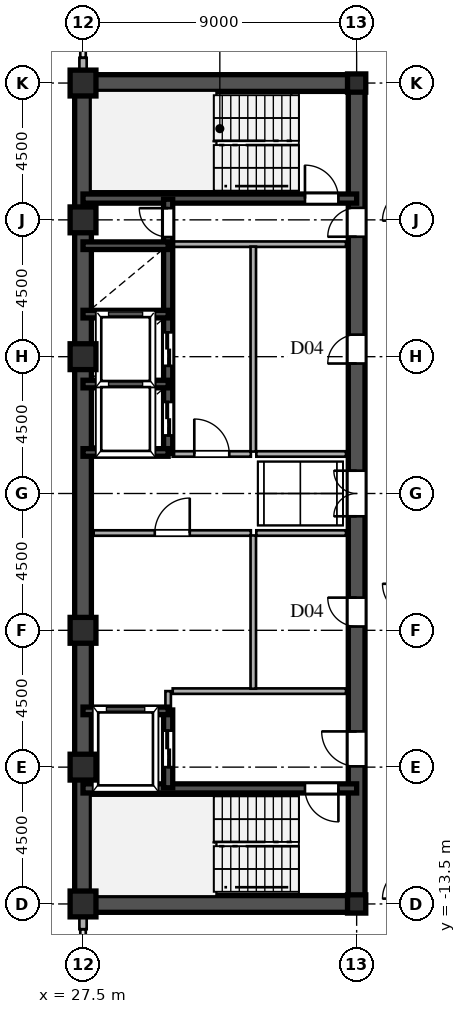
"""IFC4 building model, lengths in metres.
Left out: names, types, materials, properties, quantities, classifications, styles, units other than length and angle.
Written with IfcOpenShell. Run it as: python <this file> out.ifc"""

import sys

from ifc_helpers import new_model, si_unit, direction, frame, frame_2d, origin, origin_2d, place, context, subcontext, project, spatial, rectangle, hollow_rectangle, i_section, extrude, source, transform, mapped, element, fill, save


model = new_model("IFC4")
c1 = context("Model", 3, precision=1e-05, world=origin(), true_north=direction((0.0, 1.0)))
c2 = subcontext(c1, "Body", "Model", "MODEL_VIEW")
j1 = project(units=[si_unit("LENGTHUNIT", "METRE"), si_unit("PLANEANGLEUNIT", "RADIAN")], contexts=[c1])
p1 = place(None, origin())
s1 = spatial("IfcSite", under=j1, at=p1, CompositionType="ELEMENT")
p2 = place(p1, origin())
s2 = spatial("IfcBuilding", under=s1, at=p2, CompositionType="ELEMENT")
p3 = place(p2, frame((0.0, 0.0, 188.7)))
s3 = spatial("IfcBuildingStorey", under=s2, at=p3, CompositionType="ELEMENT", Elevation=188.7)
m1 = source(origin(), c2, "Body", "SweptSolid", [
    extrude(hollow_rectangle(XDim=0.85, YDim=0.85, WallThickness=0.036, at=origin_2d()), origin(), (0.0, 0.0, 1.0), 3.6),
])
for number, where, z_axis, x_axis in (
    (1, (27.5, -13.5, 0.0), (0.0, 0.0, 1.0), (1.0, 0.0, 0.0)),
    (2, (27.5, -9.0, 0.0), (0.0, 0.0, 1.0), (1.0, 0.0, 0.0)),
    (3, (27.5, -4.5, 0.0), (0.0, 0.0, 1.0), (1.0, 0.0, 0.0)),
    (4, (27.5, 4.5, 0.0), (0.0, 0.0, 1.0), (1.0, 0.0, 0.0)),
    (5, (27.5, 9.0, 0.0), (0.0, 0.0, 1.0), (1.0, 0.0, 0.0)),
    (6, (27.5, 13.5, 0.0), (0.0, 0.0, 1.0), (1.0, 0.0, 0.0)),
):
    element("IfcColumn", number, at=place(p3, frame(where, z_axis=z_axis, x_axis=x_axis)), inside=s3, PredefinedType="COLUMN", context=c2, shape_type="MappedRepresentation", body=[
        mapped(m1, transform((0.0, 0.0, 0.0), scale=1.0)),
    ])
m2 = source(origin(), c2, "Body", "SweptSolid", [
    extrude(i_section(OverallWidth=0.6, OverallDepth=0.6, WebThickness=0.025, FlangeThickness=0.04, at=origin_2d()), origin(), (0.0, 0.0, 1.0), 3.6),
])
for number, where, z_axis, x_axis in (
    (7, (36.5, -13.5, 0.0), (0.0, 0.0, 1.0), (1.0, 0.0, 0.0)),
    (8, (36.5, 13.5, 0.0), (0.0, 0.0, 1.0), (1.0, 0.0, 0.0)),
):
    element("IfcColumn", number, at=place(p3, frame(where, z_axis=z_axis, x_axis=x_axis)), inside=s3, PredefinedType="COLUMN", context=c2, shape_type="MappedRepresentation", body=[
        mapped(m2, transform((0.0, 0.0, 0.0), scale=1.0)),
    ])
for number, where, z_axis, x_axis in (
    (9, (27.5, -14.33, 0.0), (0.0, 0.0, 1.0), (0.0, 1.0, 0.0)),
    (10, (27.5, 13.78, 0.0), (0.0, 0.0, 1.0), (0.0, 1.0, 0.0)),
):
    element("IfcWall", number, at=place(p3, frame(where, z_axis=z_axis, x_axis=x_axis)), inside=s3, PredefinedType="SOLIDWALL", context=c2, shape_type="SweptSolid", body=[
        extrude(rectangle(XDim=0.55, YDim=0.24, at=frame_2d((0.275, 0.0))), origin(), (0.0, 0.0, 1.0), 2.88),
    ])
for number, where, z_axis, x_axis in (
    (11, (27.5, -13.5, 0.0), (0.0, 0.0, 1.0), (0.0, 1.0, 0.0)),
    (12, (27.5, 1.3, 0.0), (0.0, 0.0, 1.0), (0.0, 1.0, 0.0)),
):
    element("IfcWall", number, at=place(p3, frame(where, z_axis=z_axis, x_axis=x_axis)), inside=s3, PredefinedType="SHEAR", context=c2, shape_type="SweptSolid", body=[
        extrude(rectangle(XDim=12.2, YDim=0.55, at=frame_2d((6.1, 0.0))), origin(), (0.0, 0.0, 1.0), 3.38),
    ])
p4 = place(p3, frame((27.5, -1.3, 0.0), z_axis=(0.0, 0.0, 1.0), x_axis=(0.0, 1.0, 0.0)))
e13 = element("IfcWall", 13, at=p4, inside=s3, PredefinedType="SHEAR", context=c2, shape_type="SweptSolid", body=[
    extrude(rectangle(XDim=2.6, YDim=0.55, at=frame_2d((1.3, 0.0))), origin(), (0.0, 0.0, 1.0), 3.38),
])
for number, where, z_axis, x_axis in (
    (14, (27.5, -13.5, 0.0), (0.0, 0.0, 1.0), (1.0, 0.0, 0.0)),
    (15, (27.5, 13.5, 0.0), (0.0, 0.0, 1.0), (1.0, 0.0, 0.0)),
):
    element("IfcWall", number, at=place(p3, frame(where, z_axis=z_axis, x_axis=x_axis)), inside=s3, PredefinedType="SHEAR", context=c2, shape_type="SweptSolid", body=[
        extrude(rectangle(XDim=9.0, YDim=0.55, at=frame_2d((4.5, 0.0))), origin(), (0.0, 0.0, 1.0), 3.38),
    ])
p5 = place(p3, frame((36.5, -13.65, 0.0), z_axis=(0.0, 0.0, 1.0), x_axis=(0.0, 1.0, 0.0)))
e16 = element("IfcWall", 16, at=p5, inside=s3, PredefinedType="SHEAR", context=c2, shape_type="SweptSolid", body=[
    extrude(rectangle(XDim=7.15, YDim=0.55, at=frame_2d((3.575, 0.0))), origin(), (0.0, 0.0, 1.0), 3.38),
])
p6 = place(p5, frame((4.675, 0.0, 0.0)))
e17 = element("IfcOpeningElement", 17, at=p6, cuts=e16, PredefinedType="OPENING", context=c2, shape_type="SweptSolid", body=[
    extrude(rectangle(XDim=1.15, YDim=2.2, at=frame_2d((0.575, 1.1))), frame((0.0, 0.285, 0.0), z_axis=(0.0, -1.0, 0.0), x_axis=(1.0, 0.0, 0.0)), (0.0, 0.0, 1.0), 0.57),
])
p7 = place(p3, frame((36.5, -1.3, 0.0), z_axis=(0.0, 0.0, 1.0), x_axis=(0.0, 1.0, 0.0)))
e18 = element("IfcWall", 18, at=p7, inside=s3, PredefinedType="SHEAR", context=c2, shape_type="SweptSolid", body=[
    extrude(rectangle(XDim=2.6, YDim=0.55, at=frame_2d((1.3, 0.0))), origin(), (0.0, 0.0, 1.0), 3.38),
])
p8 = place(p7, frame((0.55, 0.0, 0.0)))
e19 = element("IfcOpeningElement", 19, at=p8, cuts=e18, PredefinedType="OPENING", context=c2, shape_type="SweptSolid", body=[
    extrude(rectangle(XDim=1.5, YDim=2.3, at=frame_2d((0.75, 1.15))), frame((0.0, 0.285, 0.0), z_axis=(0.0, -1.0, 0.0), x_axis=(1.0, 0.0, 0.0)), (0.0, 0.0, 1.0), 0.57),
])
p9 = place(p3, frame((36.5, 8.2, 0.0), z_axis=(0.0, 0.0, 1.0), x_axis=(0.0, 1.0, 0.0)))
e20 = element("IfcWall", 20, at=p9, inside=s3, PredefinedType="SHEAR", context=c2, shape_type="SweptSolid", body=[
    extrude(rectangle(XDim=5.45, YDim=0.55, at=frame_2d((2.725, 0.0))), origin(), (0.0, 0.0, 1.0), 3.38),
])
p10 = place(p9, frame((0.245, 0.0, 0.0)))
e21 = element("IfcOpeningElement", 21, at=p10, cuts=e20, PredefinedType="OPENING", context=c2, shape_type="SweptSolid", body=[
    extrude(rectangle(XDim=0.95, YDim=2.15, at=frame_2d((0.475, 1.075))), frame((0.0, 0.285, 0.0), z_axis=(0.0, -1.0, 0.0), x_axis=(1.0, 0.0, 0.0)), (0.0, 0.0, 1.0), 0.57),
])
p11 = place(p3, frame((36.5, -6.5, 0.0), z_axis=(0.0, 0.0, 1.0), x_axis=(0.0, 1.0, 0.0)))
e22 = element("IfcWall", 22, at=p11, inside=s3, PredefinedType="SHEAR", context=c2, shape_type="SweptSolid", body=[
    extrude(rectangle(XDim=5.2, YDim=0.55, at=frame_2d((2.6, 0.0))), origin(), (0.0, 0.0, 1.0), 3.38),
])
p12 = place(p11, frame((2.125, 0.0, 0.0)))
e23 = element("IfcOpeningElement", 23, at=p12, cuts=e22, PredefinedType="OPENING", context=c2, shape_type="SweptSolid", body=[
    extrude(rectangle(XDim=0.95, YDim=2.15, at=frame_2d((0.475, 1.075))), frame((0.0, 0.285, 0.0), z_axis=(0.0, -1.0, 0.0), x_axis=(1.0, 0.0, 0.0)), (0.0, 0.0, 1.0), 0.57),
])
p13 = place(p3, frame((36.5, 1.3, 0.0), z_axis=(0.0, 0.0, 1.0), x_axis=(0.0, 1.0, 0.0)))
e24 = element("IfcWall", 24, at=p13, inside=s3, PredefinedType="SHEAR", context=c2, shape_type="SweptSolid", body=[
    extrude(rectangle(XDim=6.9, YDim=0.55, at=frame_2d((3.45, 0.0))), origin(), (0.0, 0.0, 1.0), 3.38),
])
p14 = place(p13, frame((2.975, 0.0, 0.0)))
e25 = element("IfcOpeningElement", 25, at=p14, cuts=e24, PredefinedType="OPENING", context=c2, shape_type="SweptSolid", body=[
    extrude(rectangle(XDim=0.95, YDim=2.15, at=frame_2d((0.475, 1.075))), frame((0.0, 0.285, 0.0), z_axis=(0.0, -1.0, 0.0), x_axis=(1.0, 0.0, 0.0)), (0.0, 0.0, 1.0), 0.57),
])
p15 = place(p3, frame((27.5, -9.7, 0.0), z_axis=(0.0, 0.0, 1.0), x_axis=(1.0, 0.0, 0.0)))
e26 = element("IfcWall", 26, at=p15, inside=s3, PredefinedType="SHEAR", context=c2, shape_type="SweptSolid", body=[
    extrude(rectangle(XDim=9.0, YDim=0.3, at=frame_2d((4.5, 0.0))), origin(), (0.0, 0.0, 1.0), 3.38),
])
p16 = place(p15, frame((7.3, 0.0, 0.0)))
e27 = element("IfcOpeningElement", 27, at=p16, cuts=e26, PredefinedType="OPENING", context=c2, shape_type="SweptSolid", body=[
    extrude(rectangle(XDim=1.1, YDim=2.2, at=frame_2d((0.55, 1.1))), frame((0.0, 0.16, 0.0), z_axis=(0.0, -1.0, 0.0), x_axis=(1.0, 0.0, 0.0)), (0.0, 0.0, 1.0), 0.32),
])
p17 = place(p3, frame((27.5, 9.7, 0.0), z_axis=(0.0, 0.0, 1.0), x_axis=(1.0, 0.0, 0.0)))
e28 = element("IfcWall", 28, at=p17, inside=s3, PredefinedType="SHEAR", context=c2, shape_type="SweptSolid", body=[
    extrude(rectangle(XDim=9.0, YDim=0.3, at=frame_2d((4.5, 0.0))), origin(), (0.0, 0.0, 1.0), 3.38),
])
p18 = place(p17, frame((7.3, 0.0, 0.0)))
e29 = element("IfcOpeningElement", 29, at=p18, cuts=e28, PredefinedType="OPENING", context=c2, shape_type="SweptSolid", body=[
    extrude(rectangle(XDim=1.1, YDim=2.2, at=frame_2d((0.55, 1.1))), frame((0.0, 0.16, 0.0), z_axis=(0.0, -1.0, 0.0), x_axis=(1.0, 0.0, 0.0)), (0.0, 0.0, 1.0), 0.32),
])
for number, where, z_axis, x_axis in (
    (30, (27.5, -7.15, 0.0), (0.0, 0.0, 1.0), (1.0, 0.0, 0.0)),
    (31, (27.5, 1.35, 0.0), (0.0, 0.0, 1.0), (1.0, 0.0, 0.0)),
    (32, (27.5, 3.6, 0.0), (0.0, 0.0, 1.0), (1.0, 0.0, 0.0)),
    (33, (27.5, 5.9, 0.0), (0.0, 0.0, 1.0), (1.0, 0.0, 0.0)),
    (34, (27.5, 8.15, 0.0), (0.0, 0.0, 1.0), (1.0, 0.0, 0.0)),
):
    element("IfcWall", number, at=place(p3, frame(where, z_axis=z_axis, x_axis=x_axis)), inside=s3, PredefinedType="SHEAR", context=c2, shape_type="SweptSolid", body=[
        extrude(rectangle(XDim=2.8, YDim=0.25, at=frame_2d((1.4, 0.0))), origin(), (0.0, 0.0, 1.0), 3.38),
    ])
p19 = place(p3, frame((30.3, -9.68, 0.0), z_axis=(0.0, 0.0, 1.0), x_axis=(0.0, 1.0, 0.0)))
e35 = element("IfcWall", 35, at=p19, inside=s3, PredefinedType="SHEAR", context=c2, shape_type="SweptSolid", body=[
    extrude(rectangle(XDim=2.56, YDim=0.3, at=frame_2d((1.28, 0.0))), origin(), (0.0, 0.0, 1.0), 3.38),
])
p20 = place(p19, frame((0.68, 0.0, 0.0)))
e36 = element("IfcOpeningElement", 36, at=p20, cuts=e35, PredefinedType="OPENING", context=c2, shape_type="SweptSolid", body=[
    extrude(rectangle(XDim=1.2, YDim=2.25, at=frame_2d((0.6, 1.125))), frame((0.0, 0.16, 0.0), z_axis=(0.0, -1.0, 0.0), x_axis=(1.0, 0.0, 0.0)), (0.0, 0.0, 1.0), 0.32),
])
p21 = place(p3, frame((30.3, 1.32, 0.0), z_axis=(0.0, 0.0, 1.0), x_axis=(0.0, 1.0, 0.0)))
e37 = element("IfcWall", 37, at=p21, inside=s3, PredefinedType="SHEAR", context=c2, shape_type="SweptSolid", body=[
    extrude(rectangle(XDim=2.28, YDim=0.3, at=frame_2d((1.14, 0.0))), origin(), (0.0, 0.0, 1.0), 3.38),
])
p22 = place(p21, frame((0.59, 0.0, 0.0)))
e38 = element("IfcOpeningElement", 38, at=p22, cuts=e37, PredefinedType="OPENING", context=c2, shape_type="SweptSolid", body=[
    extrude(rectangle(XDim=1.1, YDim=2.2, at=frame_2d((0.55, 1.1))), frame((0.0, 0.16, 0.0), z_axis=(0.0, -1.0, 0.0), x_axis=(1.0, 0.0, 0.0)), (0.0, 0.0, 1.0), 0.32),
])
p23 = place(p3, frame((30.3, 3.6, 0.0), z_axis=(0.0, 0.0, 1.0), x_axis=(0.0, 1.0, 0.0)))
e39 = element("IfcWall", 39, at=p23, inside=s3, PredefinedType="SHEAR", context=c2, shape_type="SweptSolid", body=[
    extrude(rectangle(XDim=2.3, YDim=0.3, at=frame_2d((1.15, 0.0))), origin(), (0.0, 0.0, 1.0), 3.38),
])
p24 = place(p23, frame((0.6, 0.0, 0.0)))
e40 = element("IfcOpeningElement", 40, at=p24, cuts=e39, PredefinedType="OPENING", context=c2, shape_type="SweptSolid", body=[
    extrude(rectangle(XDim=1.1, YDim=2.2, at=frame_2d((0.55, 1.1))), frame((0.0, 0.16, 0.0), z_axis=(0.0, -1.0, 0.0), x_axis=(1.0, 0.0, 0.0)), (0.0, 0.0, 1.0), 0.32),
])
p25 = place(p3, frame((30.3, 5.9, 0.0), z_axis=(0.0, 0.0, 1.0), x_axis=(0.0, 1.0, 0.0)))
e41 = element("IfcWall", 41, at=p25, inside=s3, PredefinedType="SHEAR", context=c2, shape_type="SweptSolid", body=[
    extrude(rectangle(XDim=2.25, YDim=0.3, at=frame_2d((1.125, 0.0))), origin(), (0.0, 0.0, 1.0), 3.38),
])
p26 = place(p3, frame((30.3, 8.15, 0.0), z_axis=(0.0, 0.0, 1.0), x_axis=(0.0, 1.0, 0.0)))
e42 = element("IfcWall", 42, at=p26, inside=s3, PredefinedType="SHEAR", context=c2, shape_type="SweptSolid", body=[
    extrude(rectangle(XDim=1.53, YDim=0.3, at=frame_2d((0.765, 0.0))), origin(), (0.0, 0.0, 1.0), 3.38),
])
p27 = place(p26, frame((0.285, 0.0, 0.0)))
e43 = element("IfcOpeningElement", 43, at=p27, cuts=e42, PredefinedType="OPENING", context=c2, shape_type="SweptSolid", body=[
    extrude(rectangle(XDim=0.95, YDim=2.15, at=frame_2d((0.475, 1.075))), frame((0.0, 0.16, 0.0), z_axis=(0.0, -1.0, 0.0), x_axis=(1.0, 0.0, 0.0)), (0.0, 0.0, 1.0), 0.32),
])
p28 = place(p3, frame((30.45, -6.5, 0.0), z_axis=(0.0, 0.0, 1.0), x_axis=(1.0, 0.0, 0.0)))
e44 = element("IfcWall", 44, at=p28, inside=s3, PredefinedType="PARTITIONING", context=c2, shape_type="SweptSolid", body=[
    extrude(rectangle(XDim=5.7, YDim=0.18, at=frame_2d((2.85, 0.0))), origin(), (0.0, 0.0, 1.0), 3.38),
])
p29 = place(p3, frame((30.3, -7.12, 0.0), z_axis=(0.0, 0.0, 1.0), x_axis=(0.0, 1.0, 0.0)))
e45 = element("IfcWall", 45, at=p29, inside=s3, PredefinedType="PARTITIONING", context=c2, shape_type="SweptSolid", body=[
    extrude(rectangle(XDim=0.62, YDim=0.18, at=frame_2d((0.31, 0.0))), origin(), (0.0, 0.0, 1.0), 3.38),
])
p30 = place(p3, frame((30.45, 8.2, 0.0), z_axis=(0.0, 0.0, 1.0), x_axis=(1.0, 0.0, 0.0)))
e46 = element("IfcWall", 46, at=p30, inside=s3, PredefinedType="PARTITIONING", context=c2, shape_type="SweptSolid", body=[
    extrude(rectangle(XDim=5.7, YDim=0.18, at=frame_2d((2.85, 0.0))), origin(), (0.0, 0.0, 1.0), 3.38),
])
p31 = place(p3, frame((33.1, -6.42, 0.0), z_axis=(0.0, 0.0, 1.0), x_axis=(0.0, 1.0, 0.0)))
e47 = element("IfcWall", 47, at=p31, inside=s3, PredefinedType="PARTITIONING", context=c2, shape_type="SweptSolid", body=[
    extrude(rectangle(XDim=5.04, YDim=0.18, at=frame_2d((2.52, 0.0))), origin(), (0.0, 0.0, 1.0), 3.38),
])
p32 = place(p3, frame((33.1, 1.38, 0.0), z_axis=(0.0, 0.0, 1.0), x_axis=(0.0, 1.0, 0.0)))
e48 = element("IfcWall", 48, at=p32, inside=s3, PredefinedType="PARTITIONING", context=c2, shape_type="SweptSolid", body=[
    extrude(rectangle(XDim=6.74, YDim=0.18, at=frame_2d((3.37, 0.0))), origin(), (0.0, 0.0, 1.0), 3.38),
])
p33 = place(p3, frame((27.85, -1.3, 0.0), z_axis=(0.0, 0.0, 1.0), x_axis=(1.0, 0.0, 0.0)))
e49 = element("IfcWall", 49, at=p33, inside=s3, PredefinedType="PARTITIONING", context=c2, shape_type="SweptSolid", body=[
    extrude(rectangle(XDim=5.17, YDim=0.18, at=frame_2d((2.585, 0.0))), origin(), (0.0, 0.0, 1.0), 3.38),
])
p34 = place(p33, frame((2.01, 0.0, 0.0)))
e50 = element("IfcOpeningElement", 50, at=p34, cuts=e49, PredefinedType="OPENING", context=c2, shape_type="SweptSolid", body=[
    extrude(rectangle(XDim=1.15, YDim=2.2, at=frame_2d((0.575, 1.1))), frame((0.0, 0.1, 0.0), z_axis=(0.0, -1.0, 0.0), x_axis=(1.0, 0.0, 0.0)), (0.0, 0.0, 1.0), 0.2),
])
p35 = place(p3, frame((30.45, 1.3, 0.0), z_axis=(0.0, 0.0, 1.0), x_axis=(1.0, 0.0, 0.0)))
e51 = element("IfcWall", 51, at=p35, inside=s3, PredefinedType="PARTITIONING", context=c2, shape_type="SweptSolid", body=[
    extrude(rectangle(XDim=2.57, YDim=0.18, at=frame_2d((1.285, 0.0))), origin(), (0.0, 0.0, 1.0), 3.38),
])
p36 = place(p35, frame((0.71, 0.0, 0.0)))
e52 = element("IfcOpeningElement", 52, at=p36, cuts=e51, PredefinedType="OPENING", context=c2, shape_type="SweptSolid", body=[
    extrude(rectangle(XDim=1.15, YDim=2.2, at=frame_2d((0.575, 1.1))), frame((0.0, 0.1, 0.0), z_axis=(0.0, -1.0, 0.0), x_axis=(1.0, 0.0, 0.0)), (0.0, 0.0, 1.0), 0.2),
])
for number, where, z_axis, x_axis in (
    (53, (33.2, -1.3, 0.0), (0.0, 0.0, 1.0), (1.0, 0.0, 0.0)),
    (54, (33.2, 1.3, 0.0), (0.0, 0.0, 1.0), (1.0, 0.0, 0.0)),
):
    element("IfcWall", number, at=place(p3, frame(where, z_axis=z_axis, x_axis=x_axis)), inside=s3, PredefinedType="PARTITIONING", context=c2, shape_type="SweptSolid", body=[
        extrude(rectangle(XDim=2.95, YDim=0.18, at=frame_2d((1.475, 0.0))), origin(), (0.0, 0.0, 1.0), 3.38),
    ])
m3 = source(origin(), c2, "Body", "SweptSolid", [
    extrude(rectangle(XDim=1.15, YDim=2.2, at=frame_2d((0.575, 1.1))), frame((0.0, 0.025, 0.0), z_axis=(0.0, -1.0, 0.0), x_axis=(1.0, 0.0, 0.0)), (0.0, 0.0, 1.0), 0.05),
])
p37 = place(p6, origin())
e55 = element("IfcDoor", 55, at=p37, inside=s3, OperationType="SINGLE_SWING_RIGHT", PredefinedType="DOOR", context=c2, shape_type="MappedRepresentation", body=[
    mapped(m3, transform((0.0, 0.0, 0.0), scale=1.0)),
])
fill(e17, e55)
m4 = source(origin(), c2, "Body", "SweptSolid", [
    extrude(rectangle(XDim=1.5, YDim=2.3, at=frame_2d((0.75, 1.15))), frame((0.0, 0.025, 0.0), z_axis=(0.0, -1.0, 0.0), x_axis=(1.0, 0.0, 0.0)), (0.0, 0.0, 1.0), 0.05),
])
p38 = place(p8, origin())
e56 = element("IfcDoor", 56, at=p38, inside=s3, OperationType="DOUBLE_SWING_LEFT", PredefinedType="DOOR", context=c2, shape_type="MappedRepresentation", body=[
    mapped(m4, transform((0.0, 0.0, 0.0), scale=1.0)),
])
fill(e19, e56)
m5 = source(origin(), c2, "Body", "SweptSolid", [
    extrude(rectangle(XDim=0.95, YDim=2.15, at=frame_2d((0.475, 1.075))), frame((0.0, 0.025, 0.0), z_axis=(0.0, -1.0, 0.0), x_axis=(1.0, 0.0, 0.0)), (0.0, 0.0, 1.0), 0.05),
])
p39 = place(p10, origin())
e57 = element("IfcDoor", 57, at=p39, inside=s3, OperationType="SINGLE_SWING_LEFT", PredefinedType="DOOR", context=c2, shape_type="MappedRepresentation", body=[
    mapped(m5, transform((0.0, 0.0, 0.0), scale=1.0)),
])
fill(e21, e57)
p40 = place(p12, origin())
e58 = element("IfcDoor", 58, at=p40, inside=s3, OperationType="SINGLE_SWING_RIGHT", PredefinedType="DOOR", context=c2, shape_type="MappedRepresentation", body=[
    mapped(m5, transform((0.0, 0.0, 0.0), scale=1.0)),
])
fill(e23, e58)
p41 = place(p14, origin())
e59 = element("IfcDoor", 59, at=p41, inside=s3, OperationType="SINGLE_SWING_LEFT", PredefinedType="DOOR", context=c2, shape_type="MappedRepresentation", body=[
    mapped(m5, transform((0.0, 0.0, 0.0), scale=1.0)),
])
fill(e25, e59)
m6 = source(origin(), c2, "Body", "SweptSolid", [
    extrude(rectangle(XDim=1.1, YDim=2.2, at=frame_2d((0.55, 1.1))), frame((0.0, 0.025, 0.0), z_axis=(0.0, -1.0, 0.0), x_axis=(1.0, 0.0, 0.0)), (0.0, 0.0, 1.0), 0.05),
])
p42 = place(p16, frame((1.1, 0.0, 0.0), z_axis=(0.0, 0.0, 1.0), x_axis=(-1.0, 0.0, 0.0)))
e60 = element("IfcDoor", 60, at=p42, inside=s3, OperationType="SINGLE_SWING_RIGHT", PredefinedType="DOOR", context=c2, shape_type="MappedRepresentation", body=[
    mapped(m6, transform((0.0, 0.0, 0.0), scale=1.0)),
])
fill(e27, e60)
p43 = place(p18, origin())
e61 = element("IfcDoor", 61, at=p43, inside=s3, OperationType="SINGLE_SWING_LEFT", PredefinedType="DOOR", context=c2, shape_type="MappedRepresentation", body=[
    mapped(m6, transform((0.0, 0.0, 0.0), scale=1.0)),
])
fill(e29, e61)
m7 = source(origin(), c2, "Body", "SweptSolid", [
    extrude(rectangle(XDim=1.2, YDim=2.25, at=frame_2d((0.6, 1.125))), frame((0.0, 0.025, 0.0), z_axis=(0.0, -1.0, 0.0), x_axis=(1.0, 0.0, 0.0)), (0.0, 0.0, 1.0), 0.05),
])
p44 = place(p20, origin())
e62 = element("IfcDoor", 62, at=p44, inside=s3, OperationType="DOUBLE_DOOR_SLIDING", PredefinedType="DOOR", context=c2, shape_type="MappedRepresentation", body=[
    mapped(m7, transform((0.0, 0.0, 0.0), scale=1.0)),
])
fill(e36, e62)
m8 = source(origin(), c2, "Body", "SweptSolid", [
    extrude(rectangle(XDim=1.1, YDim=2.2, at=frame_2d((0.55, 1.1))), frame((0.0, 0.025, 0.0), z_axis=(0.0, -1.0, 0.0), x_axis=(1.0, 0.0, 0.0)), (0.0, 0.0, 1.0), 0.05),
])
p45 = place(p22, origin())
e63 = element("IfcDoor", 63, at=p45, inside=s3, OperationType="DOUBLE_DOOR_SLIDING", PredefinedType="DOOR", context=c2, shape_type="MappedRepresentation", body=[
    mapped(m8, transform((0.0, 0.0, 0.0), scale=1.0)),
])
fill(e38, e63)
p46 = place(p24, origin())
e64 = element("IfcDoor", 64, at=p46, inside=s3, OperationType="DOUBLE_DOOR_SLIDING", PredefinedType="DOOR", context=c2, shape_type="MappedRepresentation", body=[
    mapped(m8, transform((0.0, 0.0, 0.0), scale=1.0)),
])
fill(e40, e64)
p47 = place(p27, origin())
e65 = element("IfcDoor", 65, at=p47, inside=s3, OperationType="SINGLE_SWING_RIGHT", PredefinedType="DOOR", context=c2, shape_type="MappedRepresentation", body=[
    mapped(m5, transform((0.0, 0.0, 0.0), scale=1.0)),
])
fill(e43, e65)
p48 = place(p34, origin())
e66 = element("IfcDoor", 66, at=p48, inside=s3, OperationType="SINGLE_SWING_RIGHT", PredefinedType="DOOR", context=c2, shape_type="MappedRepresentation", body=[
    mapped(m3, transform((0.0, 0.0, 0.0), scale=1.0)),
])
fill(e50, e66)
p49 = place(p36, origin())
e67 = element("IfcDoor", 67, at=p49, inside=s3, OperationType="SINGLE_SWING_LEFT", PredefinedType="DOOR", context=c2, shape_type="MappedRepresentation", body=[
    mapped(m3, transform((0.0, 0.0, 0.0), scale=1.0)),
])
fill(e52, e67)
save(model, sys.argv[1])
